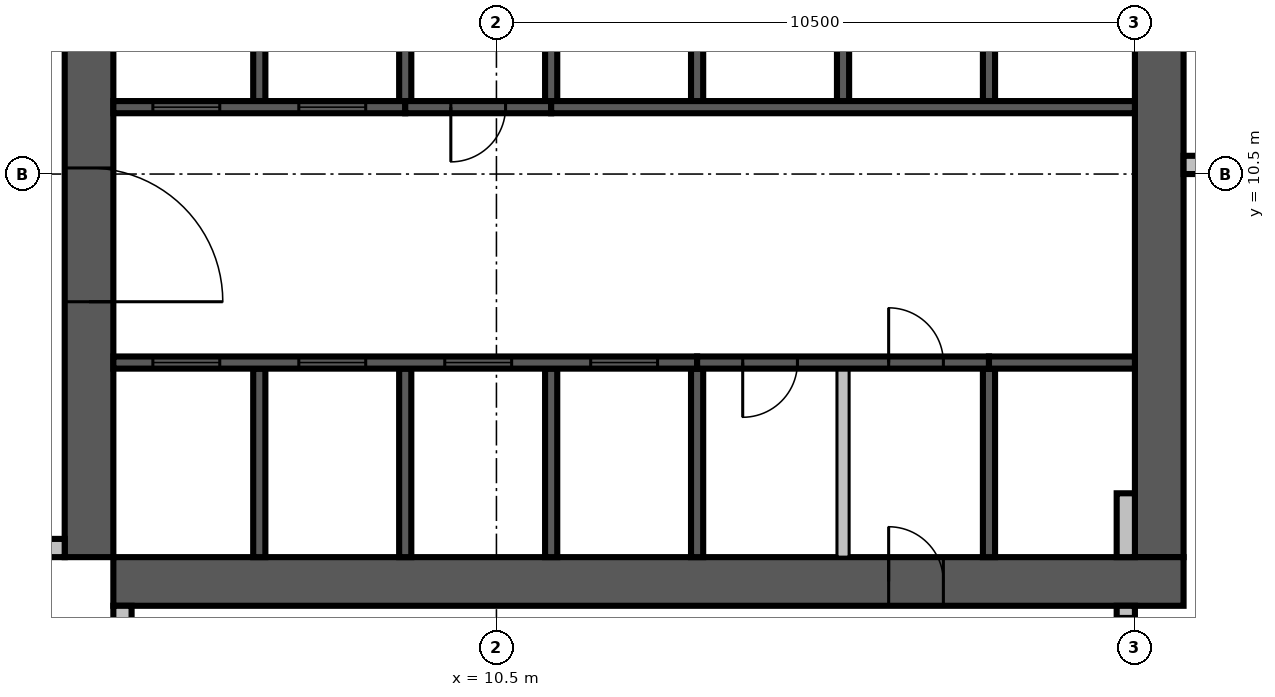
"""IFC4 building model, lengths in metres.
Left out: names, types, materials, properties, quantities, classifications, styles, units other than length and angle.
Written with IfcOpenShell. Run it as: python <this file> out.ifc"""

import sys

from ifc_helpers import new_model, si_unit, direction, frame, frame_2d, origin, place, context, subcontext, project, spatial, rectangle, extrude, source, transform, mapped, element, fill, save


model = new_model("IFC4")
c1 = context("Model", 3, precision=1e-05, world=origin(), true_north=direction((0.0, 1.0)))
c2 = subcontext(c1, "Body", "Model", "MODEL_VIEW")
j1 = project(units=[si_unit("LENGTHUNIT", "METRE"), si_unit("PLANEANGLEUNIT", "RADIAN")], contexts=[c1])
p1 = place(None, origin())
s1 = spatial("IfcSite", under=j1, at=p1, CompositionType="ELEMENT")
p2 = place(p1, origin())
s2 = spatial("IfcBuilding", under=s1, at=p2, CompositionType="ELEMENT")
p3 = place(p2, frame((0.0, 0.0, 261.4)))
s3 = spatial("IfcBuildingStorey", under=s2, at=p3, CompositionType="ELEMENT", Elevation=261.4)
m1 = source(origin(), c2, "Body", "SweptSolid", [
    extrude(rectangle(XDim=17.6, YDim=0.8, at=frame_2d((8.8, 0.0))), origin(), (0.0, 0.0, 1.0), 3.8),
])
p4 = place(p3, frame((3.8, 4.2, 0.0), z_axis=(0.0, 0.0, 1.0), x_axis=(0.0, 1.0, 0.0)))
e1 = element("IfcWall", 1, at=p4, inside=s3, PredefinedType="SHEAR", context=c2, shape_type="MappedRepresentation", body=[
    mapped(m1, transform((0.0, 0.0, 0.0), scale=1.0)),
])
m2 = source(origin(), c2, "Body", "SweptSolid", [
    extrude(rectangle(XDim=2.2, YDim=2.1, at=frame_2d((1.1, 1.05))), frame((0.0, 0.41, 0.0), z_axis=(0.0, -1.0, 0.0), x_axis=(1.0, 0.0, 0.0)), (0.0, 0.0, 1.0), 0.82),
])
p5 = place(p4, frame((4.2, 0.0, 0.0)))
e2 = element("IfcOpeningElement", 2, at=p5, cuts=e1, PredefinedType="OPENING", context=c2, shape_type="MappedRepresentation", body=[
    mapped(m2, transform((0.0, 0.0, 0.0), scale=1.0)),
])
m3 = source(origin(), c2, "Body", "SweptSolid", [
    extrude(rectangle(XDim=0.9, YDim=2.1, at=frame_2d((0.45, 1.05))), frame((0.0, 0.41, 0.0), z_axis=(0.0, -1.0, 0.0), x_axis=(1.0, 0.0, 0.0)), (0.0, 0.0, 1.0), 0.82),
])
p6 = place(p4, frame((10.95, 0.0, 0.0)))
e3 = element("IfcOpeningElement", 3, at=p6, cuts=e1, PredefinedType="OPENING", context=c2, shape_type="MappedRepresentation", body=[
    mapped(m3, transform((0.0, 0.0, 0.0), scale=1.0)),
])
m4 = source(origin(), c2, "Body", "SweptSolid", [
    extrude(rectangle(XDim=16.8, YDim=0.8, at=frame_2d((8.4, 0.0))), origin(), (0.0, 0.0, 1.0), 3.8),
])
p7 = place(p3, frame((21.4, 4.2, 0.0), z_axis=(0.0, 0.0, 1.0), x_axis=(0.0, 1.0, 0.0)))
e4 = element("IfcWall", 4, at=p7, inside=s3, PredefinedType="SHEAR", context=c2, shape_type="MappedRepresentation", body=[
    mapped(m4, transform((0.0, 0.0, 0.0), scale=1.0)),
])
m5 = source(origin(), c2, "Body", "SweptSolid", [
    extrude(rectangle(XDim=1.2, YDim=2.1, at=frame_2d((0.6, 1.05))), frame((0.0, 0.41, 0.0), z_axis=(0.0, -1.0, 0.0), x_axis=(1.0, 0.0, 0.0)), (0.0, 0.0, 1.0), 0.82),
])
p8 = place(p7, frame((14.7, 0.0, 0.0)))
e5 = element("IfcOpeningElement", 5, at=p8, cuts=e4, PredefinedType="OPENING", context=c2, shape_type="MappedRepresentation", body=[
    mapped(m5, transform((0.0, 0.0, 0.0), scale=1.0)),
])
p9 = place(p3, frame((4.2, 3.8, 0.0), z_axis=(0.0, 0.0, 1.0), x_axis=(1.0, 0.0, 0.0)))
e6 = element("IfcWall", 6, at=p9, inside=s3, PredefinedType="SHEAR", context=c2, shape_type="MappedRepresentation", body=[
    mapped(m1, transform((0.0, 0.0, 0.0), scale=1.0)),
])
p10 = place(p9, frame((12.75, 0.0, 0.0)))
e7 = element("IfcOpeningElement", 7, at=p10, cuts=e6, PredefinedType="OPENING", context=c2, shape_type="MappedRepresentation", body=[
    mapped(m3, transform((0.0, 0.0, 0.0), scale=1.0)),
])
m6 = source(origin(), c2, "Body", "SweptSolid", [
    extrude(rectangle(XDim=2.6, YDim=0.3, at=frame_2d((1.3, 0.0))), origin(), (0.0, 0.0, 1.0), 3.4),
])
p11 = place(p3, frame((20.85, 0.8, 0.0), z_axis=(0.0, 0.0, 1.0), x_axis=(0.0, 1.0, 0.0)))
e8 = element("IfcWall", 8, at=p11, inside=s3, PredefinedType="STANDARD", context=c2, shape_type="MappedRepresentation", body=[
    mapped(m6, transform((0.0, 0.0, 0.0), scale=1.0)),
])
m7 = source(origin(), c2, "Body", "SweptSolid", [
    extrude(rectangle(XDim=1.2, YDim=2.3, at=frame_2d((0.6, 1.15))), frame((0.0, 0.16, 0.0), z_axis=(0.0, -1.0, 0.0), x_axis=(1.0, 0.0, 0.0)), (0.0, 0.0, 1.0), 0.32),
])
p12 = place(p11, frame((1.225, 0.0, 0.6)))
e9 = element("IfcOpeningElement", 9, at=p12, cuts=e8, PredefinedType="OPENING", context=c2, shape_type="MappedRepresentation", body=[
    mapped(m7, transform((0.0, 0.0, 0.0), scale=1.0)),
])
m8 = source(origin(), c2, "Body", "SweptSolid", [
    extrude(rectangle(XDim=1.05, YDim=0.3, at=frame_2d((0.525, 0.0))), origin(), (0.0, 0.0, 1.0), 3.4),
])
p13 = place(p3, frame((20.85, 4.2, 0.0), z_axis=(0.0, 0.0, 1.0), x_axis=(0.0, 1.0, 0.0)))
e10 = element("IfcWall", 10, at=p13, inside=s3, PredefinedType="STANDARD", context=c2, shape_type="MappedRepresentation", body=[
    mapped(m8, transform((0.0, 0.0, 0.0), scale=1.0)),
])
m9 = source(origin(), c2, "Body", "SweptSolid", [
    extrude(rectangle(XDim=7.2, YDim=0.3, at=frame_2d((3.6, 0.0))), origin(), (0.0, 0.0, 1.0), 3.4),
])
p14 = place(p3, frame((21.8, 10.65, 0.0), z_axis=(0.0, 0.0, 1.0), x_axis=(1.0, 0.0, 0.0)))
e11 = element("IfcWall", 11, at=p14, inside=s3, PredefinedType="STANDARD", context=c2, shape_type="MappedRepresentation", body=[
    mapped(m9, transform((0.0, 0.0, 0.0), scale=1.0)),
])
m10 = source(origin(), c2, "Body", "SweptSolid", [
    extrude(rectangle(XDim=1.8, YDim=2.3, at=frame_2d((0.9, 1.15))), frame((0.0, 0.16, 0.0), z_axis=(0.0, -1.0, 0.0), x_axis=(1.0, 0.0, 0.0)), (0.0, 0.0, 1.0), 0.32),
])
p15 = place(p14, frame((0.4, 0.0, 0.6)))
e12 = element("IfcOpeningElement", 12, at=p15, cuts=e11, PredefinedType="OPENING", context=c2, shape_type="MappedRepresentation", body=[
    mapped(m10, transform((0.0, 0.0, 0.0), scale=1.0)),
])
p16 = place(p14, frame((4.787, 0.0, 0.6)))
e13 = element("IfcOpeningElement", 13, at=p16, cuts=e11, PredefinedType="OPENING", context=c2, shape_type="MappedRepresentation", body=[
    mapped(m10, transform((0.0, 0.0, 0.0), scale=1.0)),
])
m11 = source(origin(), c2, "Body", "SweptSolid", [
    extrude(rectangle(XDim=3.4, YDim=0.3, at=frame_2d((1.7, 0.0))), origin(), (0.0, 0.0, 1.0), 3.4),
])
p17 = place(p3, frame((0.0, 4.35, 0.0), z_axis=(0.0, 0.0, 1.0), x_axis=(1.0, 0.0, 0.0)))
e14 = element("IfcWall", 14, at=p17, inside=s3, PredefinedType="STANDARD", context=c2, shape_type="MappedRepresentation", body=[
    mapped(m11, transform((0.0, 0.0, 0.0), scale=1.0)),
])
p18 = place(p17, frame((1.2, 0.0, 0.6)))
e15 = element("IfcOpeningElement", 15, at=p18, cuts=e14, PredefinedType="OPENING", context=c2, shape_type="MappedRepresentation", body=[
    mapped(m10, transform((0.0, 0.0, 0.0), scale=1.0)),
])
p19 = place(p3, frame((4.35, 3.4, 0.0), z_axis=(0.0, 0.0, 1.0), x_axis=(0.0, -1.0, 0.0)))
e16 = element("IfcWall", 16, at=p19, inside=s3, PredefinedType="STANDARD", context=c2, shape_type="MappedRepresentation", body=[
    mapped(m11, transform((0.0, 0.0, 0.0), scale=1.0)),
])
p20 = place(p19, frame((0.4, 0.0, 0.6)))
e17 = element("IfcOpeningElement", 17, at=p20, cuts=e16, PredefinedType="OPENING", context=c2, shape_type="MappedRepresentation", body=[
    mapped(m10, transform((0.0, 0.0, 0.0), scale=1.0)),
])
m12 = source(origin(), c2, "Body", "SweptSolid", [
    extrude(rectangle(XDim=3.1, YDim=0.2, at=frame_2d((1.55, 0.0))), origin(), (0.0, 0.0, 1.0), 3.8),
])
for number, where, z_axis, x_axis in (
    (18, (6.6, 4.2, 0.0), (0.0, 0.0, 1.0), (0.0, 1.0, 0.0)),
    (19, (9.0, 4.2, 0.0), (0.0, 0.0, 1.0), (0.0, 1.0, 0.0)),
    (20, (11.4, 4.2, 0.0), (0.0, 0.0, 1.0), (0.0, 1.0, 0.0)),
):
    element("IfcWall", number, at=place(p3, frame(where, z_axis=z_axis, x_axis=x_axis)), inside=s3, PredefinedType="SOLIDWALL", context=c2, shape_type="MappedRepresentation", body=[
        mapped(m12, transform((0.0, 0.0, 0.0), scale=1.0)),
    ])
m13 = source(origin(), c2, "Body", "SweptSolid", [
    extrude(rectangle(XDim=3.1, YDim=0.2, at=frame_2d((1.55, 0.0))), origin(), (0.0, 0.0, 1.0), 3.4),
])
for number, where, z_axis, x_axis in (
    (21, (13.8, 4.2, 0.0), (0.0, 0.0, 1.0), (0.0, 1.0, 0.0)),
    (22, (18.6, 4.2, 0.0), (0.0, 0.0, 1.0), (0.0, 1.0, 0.0)),
):
    element("IfcWall", number, at=place(p3, frame(where, z_axis=z_axis, x_axis=x_axis)), inside=s3, PredefinedType="SOLIDWALL", context=c2, shape_type="MappedRepresentation", body=[
        mapped(m13, transform((0.0, 0.0, 0.0), scale=1.0)),
    ])
m14 = source(origin(), c2, "Body", "SweptSolid", [
    extrude(rectangle(XDim=3.1, YDim=0.2, at=frame_2d((1.55, 0.0))), origin(), (0.0, 0.0, 1.0), 3.4),
])
p21 = place(p3, frame((16.2, 4.2, 0.0), z_axis=(0.0, 0.0, 1.0), x_axis=(0.0, 1.0, 0.0)))
e23 = element("IfcWall", 23, at=p21, inside=s3, PredefinedType="PARTITIONING", context=c2, shape_type="MappedRepresentation", body=[
    mapped(m14, transform((0.0, 0.0, 0.0), scale=1.0)),
])
m15 = source(origin(), c2, "Body", "SweptSolid", [
    extrude(rectangle(XDim=3.0, YDim=0.2, at=frame_2d((1.5, 0.0))), origin(), (0.0, 0.0, 1.0), 3.8),
])
p22 = place(p3, frame((6.6, 11.7, 0.0), z_axis=(0.0, 0.0, 1.0), x_axis=(0.0, 1.0, 0.0)))
e24 = element("IfcWall", 24, at=p22, inside=s3, PredefinedType="SOLIDWALL", context=c2, shape_type="MappedRepresentation", body=[
    mapped(m15, transform((0.0, 0.0, 0.0), scale=1.0)),
])
m16 = source(origin(), c2, "Body", "SweptSolid", [
    extrude(rectangle(XDim=3.0, YDim=0.2, at=frame_2d((1.5, 0.0))), origin(), (0.0, 0.0, 1.0), 3.4),
])
for number, where, z_axis, x_axis in (
    (25, (9.0, 11.7, 0.0), (0.0, 0.0, 1.0), (0.0, 1.0, 0.0)),
    (26, (11.4, 11.7, 0.0), (0.0, 0.0, 1.0), (0.0, 1.0, 0.0)),
):
    element("IfcWall", number, at=place(p3, frame(where, z_axis=z_axis, x_axis=x_axis)), inside=s3, PredefinedType="SOLIDWALL", context=c2, shape_type="MappedRepresentation", body=[
        mapped(m16, transform((0.0, 0.0, 0.0), scale=1.0)),
    ])
for number, where, z_axis, x_axis in (
    (27, (13.8, 11.7, 0.0), (0.0, 0.0, 1.0), (0.0, 1.0, 0.0)),
    (28, (16.2, 11.7, 0.0), (0.0, 0.0, 1.0), (0.0, 1.0, 0.0)),
    (29, (18.6, 11.7, 0.0), (0.0, 0.0, 1.0), (0.0, 1.0, 0.0)),
):
    element("IfcWall", number, at=place(p3, frame(where, z_axis=z_axis, x_axis=x_axis)), inside=s3, PredefinedType="SOLIDWALL", context=c2, shape_type="MappedRepresentation", body=[
        mapped(m15, transform((0.0, 0.0, 0.0), scale=1.0)),
    ])
m17 = source(origin(), c2, "Body", "SweptSolid", [
    extrude(rectangle(XDim=9.6, YDim=0.2, at=frame_2d((4.8, 0.0))), origin(), (0.0, 0.0, 1.0), 3.8),
])
p23 = place(p3, frame((4.2, 7.4, 0.0), z_axis=(0.0, 0.0, 1.0), x_axis=(1.0, 0.0, 0.0)))
e30 = element("IfcWall", 30, at=p23, inside=s3, PredefinedType="SOLIDWALL", context=c2, shape_type="MappedRepresentation", body=[
    mapped(m17, transform((0.0, 0.0, 0.0), scale=1.0)),
])
m18 = source(origin(), c2, "Body", "SweptSolid", [
    extrude(rectangle(XDim=1.1, YDim=2.1, at=frame_2d((0.55, 1.05))), frame((0.0, 0.11, 0.0), z_axis=(0.0, -1.0, 0.0), x_axis=(1.0, 0.0, 0.0)), (0.0, 0.0, 1.0), 0.22),
])
p24 = place(p23, frame((0.65, 0.0, 0.0)))
e31 = element("IfcOpeningElement", 31, at=p24, cuts=e30, PredefinedType="OPENING", context=c2, shape_type="MappedRepresentation", body=[
    mapped(m18, transform((0.0, 0.0, 0.0), scale=1.0)),
])
p25 = place(p23, frame((3.05, 0.0, 0.0)))
e32 = element("IfcOpeningElement", 32, at=p25, cuts=e30, PredefinedType="OPENING", context=c2, shape_type="MappedRepresentation", body=[
    mapped(m18, transform((0.0, 0.0, 0.0), scale=1.0)),
])
p26 = place(p23, frame((5.45, 0.0, 0.0)))
e33 = element("IfcOpeningElement", 33, at=p26, cuts=e30, PredefinedType="OPENING", context=c2, shape_type="MappedRepresentation", body=[
    mapped(m18, transform((0.0, 0.0, 0.0), scale=1.0)),
])
p27 = place(p23, frame((7.85, 0.0, 0.0)))
e34 = element("IfcOpeningElement", 34, at=p27, cuts=e30, PredefinedType="OPENING", context=c2, shape_type="MappedRepresentation", body=[
    mapped(m18, transform((0.0, 0.0, 0.0), scale=1.0)),
])
m19 = source(origin(), c2, "Body", "SweptSolid", [
    extrude(rectangle(XDim=4.8, YDim=0.2, at=frame_2d((2.4, 0.0))), origin(), (0.0, 0.0, 1.0), 3.4),
])
p28 = place(p3, frame((13.8, 7.4, 0.0), z_axis=(0.0, 0.0, 1.0), x_axis=(1.0, 0.0, 0.0)))
e35 = element("IfcWall", 35, at=p28, inside=s3, PredefinedType="SOLIDWALL", context=c2, shape_type="MappedRepresentation", body=[
    mapped(m19, transform((0.0, 0.0, 0.0), scale=1.0)),
])
m20 = source(origin(), c2, "Body", "SweptSolid", [
    extrude(rectangle(XDim=0.9, YDim=2.1, at=frame_2d((0.45, 1.05))), frame((0.0, 0.11, 0.0), z_axis=(0.0, -1.0, 0.0), x_axis=(1.0, 0.0, 0.0)), (0.0, 0.0, 1.0), 0.22),
])
p29 = place(p28, frame((0.75, 0.0, 0.0)))
e36 = element("IfcOpeningElement", 36, at=p29, cuts=e35, PredefinedType="OPENING", context=c2, shape_type="MappedRepresentation", body=[
    mapped(m20, transform((0.0, 0.0, 0.0), scale=1.0)),
])
p30 = place(p28, frame((3.15, 0.0, 0.0)))
e37 = element("IfcOpeningElement", 37, at=p30, cuts=e35, PredefinedType="OPENING", context=c2, shape_type="MappedRepresentation", body=[
    mapped(m20, transform((0.0, 0.0, 0.0), scale=1.0)),
])
m21 = source(origin(), c2, "Body", "SweptSolid", [
    extrude(rectangle(XDim=2.4, YDim=0.2, at=frame_2d((1.2, 0.0))), origin(), (0.0, 0.0, 1.0), 3.8),
])
p31 = place(p3, frame((18.6, 7.4, 0.0), z_axis=(0.0, 0.0, 1.0), x_axis=(1.0, 0.0, 0.0)))
e38 = element("IfcWall", 38, at=p31, inside=s3, PredefinedType="SOLIDWALL", context=c2, shape_type="MappedRepresentation", body=[
    mapped(m21, transform((0.0, 0.0, 0.0), scale=1.0)),
])
m22 = source(origin(), c2, "Body", "SweptSolid", [
    extrude(rectangle(XDim=4.8, YDim=0.2, at=frame_2d((2.4, 0.0))), origin(), (0.0, 0.0, 1.0), 3.8),
])
p32 = place(p3, frame((4.2, 11.6, 0.0), z_axis=(0.0, 0.0, 1.0), x_axis=(1.0, 0.0, 0.0)))
e39 = element("IfcWall", 39, at=p32, inside=s3, PredefinedType="SOLIDWALL", context=c2, shape_type="MappedRepresentation", body=[
    mapped(m22, transform((0.0, 0.0, 0.0), scale=1.0)),
])
p33 = place(p32, frame((0.65, 0.0, 0.0)))
e40 = element("IfcOpeningElement", 40, at=p33, cuts=e39, PredefinedType="OPENING", context=c2, shape_type="MappedRepresentation", body=[
    mapped(m18, transform((0.0, 0.0, 0.0), scale=1.0)),
])
p34 = place(p32, frame((3.05, 0.0, 0.0)))
e41 = element("IfcOpeningElement", 41, at=p34, cuts=e39, PredefinedType="OPENING", context=c2, shape_type="MappedRepresentation", body=[
    mapped(m18, transform((0.0, 0.0, 0.0), scale=1.0)),
])
m23 = source(origin(), c2, "Body", "SweptSolid", [
    extrude(rectangle(XDim=2.4, YDim=0.2, at=frame_2d((1.2, 0.0))), origin(), (0.0, 0.0, 1.0), 3.4),
])
p35 = place(p3, frame((9.0, 11.6, 0.0), z_axis=(0.0, 0.0, 1.0), x_axis=(1.0, 0.0, 0.0)))
e42 = element("IfcWall", 42, at=p35, inside=s3, PredefinedType="SOLIDWALL", context=c2, shape_type="MappedRepresentation", body=[
    mapped(m23, transform((0.0, 0.0, 0.0), scale=1.0)),
])
p36 = place(p35, frame((0.75, 0.0, 0.0)))
e43 = element("IfcOpeningElement", 43, at=p36, cuts=e42, PredefinedType="OPENING", context=c2, shape_type="MappedRepresentation", body=[
    mapped(m20, transform((0.0, 0.0, 0.0), scale=1.0)),
])
p37 = place(p3, frame((11.4, 11.6, 0.0), z_axis=(0.0, 0.0, 1.0), x_axis=(1.0, 0.0, 0.0)))
e44 = element("IfcWall", 44, at=p37, inside=s3, PredefinedType="SOLIDWALL", context=c2, shape_type="MappedRepresentation", body=[
    mapped(m17, transform((0.0, 0.0, 0.0), scale=1.0)),
])
m24 = source(origin(), c2, "Body", "SweptSolid", [
    extrude(rectangle(XDim=1.2, YDim=2.3, at=frame_2d((0.6, 1.15))), frame((0.0, 0.03, 0.0), z_axis=(0.0, -1.0, 0.0), x_axis=(1.0, 0.0, 0.0)), (0.0, 0.0, 1.0), 0.06),
])
p38 = place(p12, origin())
e45 = element("IfcWindow", 45, at=p38, inside=s3, PartitioningType="SINGLE_PANEL", PredefinedType="WINDOW", context=c2, shape_type="MappedRepresentation", body=[
    mapped(m24, transform((0.0, 0.0, 0.0), scale=1.0)),
])
fill(e9, e45)
m25 = source(origin(), c2, "Body", "SweptSolid", [
    extrude(rectangle(XDim=1.1, YDim=2.1, at=frame_2d((0.55, 1.05))), frame((0.0, 0.025, 0.0), z_axis=(0.0, -1.0, 0.0), x_axis=(1.0, 0.0, 0.0)), (0.0, 0.0, 1.0), 0.05),
])
p39 = place(p24, origin())
e46 = element("IfcDoor", 46, at=p39, inside=s3, OperationType="SLIDING_TO_LEFT", PredefinedType="DOOR", context=c2, shape_type="MappedRepresentation", body=[
    mapped(m25, transform((0.0, 0.0, 0.0), scale=1.0)),
])
fill(e31, e46)
p40 = place(p25, origin())
e47 = element("IfcDoor", 47, at=p40, inside=s3, OperationType="SLIDING_TO_LEFT", PredefinedType="DOOR", context=c2, shape_type="MappedRepresentation", body=[
    mapped(m25, transform((0.0, 0.0, 0.0), scale=1.0)),
])
fill(e32, e47)
p41 = place(p26, origin())
e48 = element("IfcDoor", 48, at=p41, inside=s3, OperationType="SLIDING_TO_LEFT", PredefinedType="DOOR", context=c2, shape_type="MappedRepresentation", body=[
    mapped(m25, transform((0.0, 0.0, 0.0), scale=1.0)),
])
fill(e33, e48)
p42 = place(p27, origin())
e49 = element("IfcDoor", 49, at=p42, inside=s3, OperationType="SLIDING_TO_LEFT", PredefinedType="DOOR", context=c2, shape_type="MappedRepresentation", body=[
    mapped(m25, transform((0.0, 0.0, 0.0), scale=1.0)),
])
fill(e34, e49)
m26 = source(origin(), c2, "Body", "SweptSolid", [
    extrude(rectangle(XDim=0.9, YDim=2.1, at=frame_2d((0.45, 1.05))), frame((0.0, 0.025, 0.0), z_axis=(0.0, -1.0, 0.0), x_axis=(1.0, 0.0, 0.0)), (0.0, 0.0, 1.0), 0.05),
])
p43 = place(p29, origin())
e50 = element("IfcDoor", 50, at=p43, inside=s3, OperationType="SINGLE_SWING_RIGHT", PredefinedType="DOOR", context=c2, shape_type="MappedRepresentation", body=[
    mapped(m26, transform((0.0, 0.0, 0.0), scale=1.0)),
])
fill(e36, e50)
p44 = place(p30, origin())
e51 = element("IfcDoor", 51, at=p44, inside=s3, OperationType="SINGLE_SWING_LEFT", PredefinedType="DOOR", context=c2, shape_type="MappedRepresentation", body=[
    mapped(m26, transform((0.0, 0.0, 0.0), scale=1.0)),
])
fill(e37, e51)
p45 = place(p33, origin())
e52 = element("IfcDoor", 52, at=p45, inside=s3, OperationType="SLIDING_TO_LEFT", PredefinedType="DOOR", context=c2, shape_type="MappedRepresentation", body=[
    mapped(m25, transform((0.0, 0.0, 0.0), scale=1.0)),
])
fill(e40, e52)
p46 = place(p34, origin())
e53 = element("IfcDoor", 53, at=p46, inside=s3, OperationType="SLIDING_TO_LEFT", PredefinedType="DOOR", context=c2, shape_type="MappedRepresentation", body=[
    mapped(m25, transform((0.0, 0.0, 0.0), scale=1.0)),
])
fill(e41, e53)
p47 = place(p36, origin())
e54 = element("IfcDoor", 54, at=p47, inside=s3, OperationType="SINGLE_SWING_RIGHT", PredefinedType="DOOR", context=c2, shape_type="MappedRepresentation", body=[
    mapped(m26, transform((0.0, 0.0, 0.0), scale=1.0)),
])
fill(e43, e54)
m27 = source(origin(), c2, "Body", "SweptSolid", [
    extrude(rectangle(XDim=2.2, YDim=2.1, at=frame_2d((1.1, 1.05))), frame((0.0, 0.025, 0.0), z_axis=(0.0, -1.0, 0.0), x_axis=(1.0, 0.0, 0.0)), (0.0, 0.0, 1.0), 0.05),
])
p48 = place(p5, origin())
e55 = element("IfcDoor", 55, at=p48, inside=s3, OperationType="DOUBLE_DOOR_SINGLE_SWING", PredefinedType="DOOR", context=c2, shape_type="MappedRepresentation", body=[
    mapped(m27, transform((0.0, 0.0, 0.0), scale=1.0)),
])
fill(e2, e55)
p49 = place(p10, origin())
e56 = element("IfcDoor", 56, at=p49, inside=s3, OperationType="SINGLE_SWING_LEFT", PredefinedType="DOOR", context=c2, shape_type="MappedRepresentation", body=[
    mapped(m26, transform((0.0, 0.0, 0.0), scale=1.0)),
])
fill(e7, e56)
save(model, sys.argv[1])
